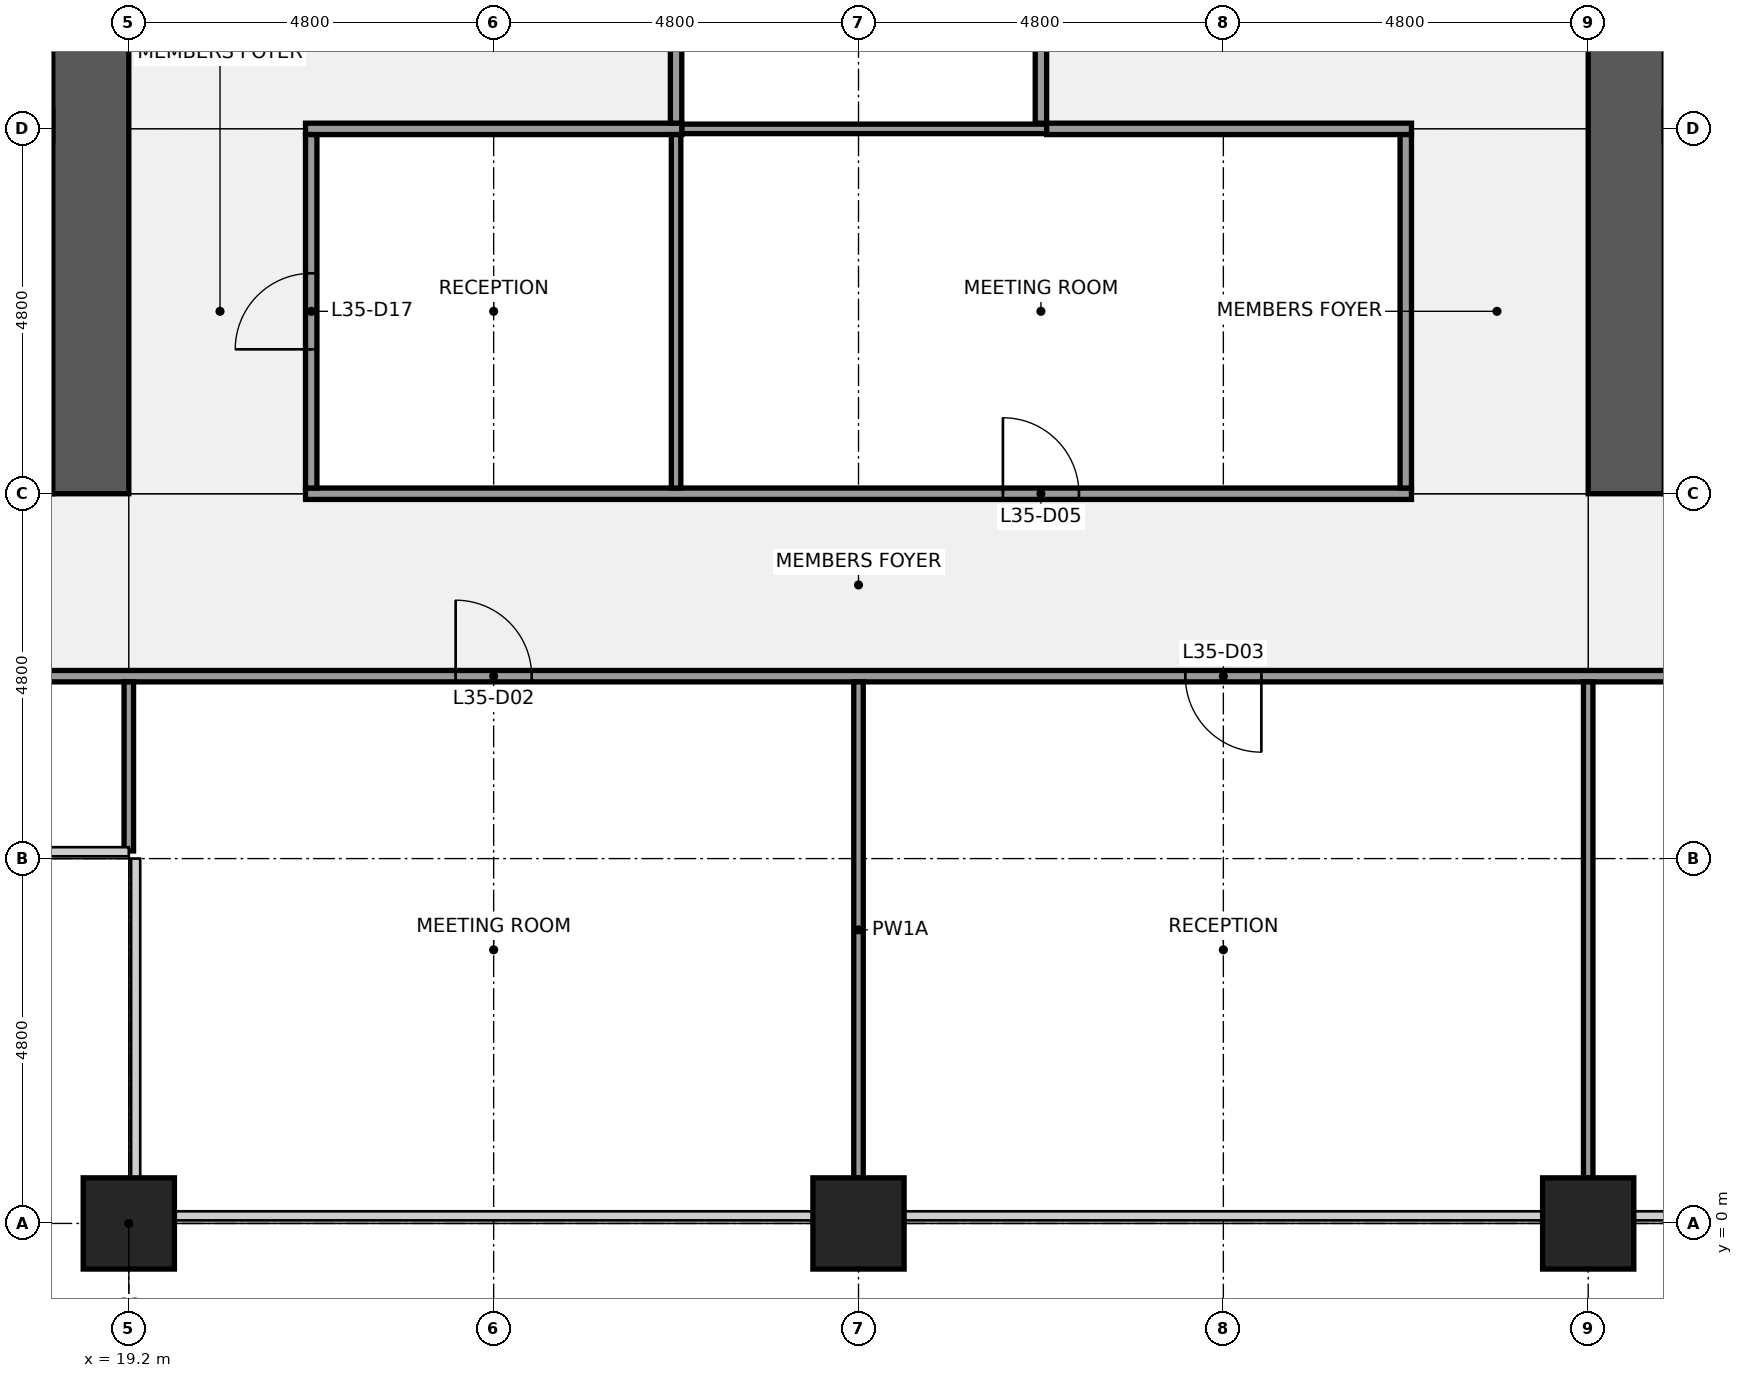
"""IFC4 building model, lengths in metres.
Left out: names, types, materials, properties, quantities, classifications, styles, units other than length and angle.
Written with IfcOpenShell. Run it as: python <this file> out.ifc"""

import sys

from ifc_helpers import new_model, si_unit, direction, frame, frame_2d, origin, origin_2d, place, context, subcontext, project, spatial, rectangle, extrude, element, fill, save


model = new_model("IFC4")
c1 = context("Model", 3, precision=1e-05, world=origin(), true_north=direction((0.0, 1.0)))
c2 = subcontext(c1, "Body", "Model", "MODEL_VIEW")
j1 = project(units=[si_unit("LENGTHUNIT", "METRE"), si_unit("PLANEANGLEUNIT", "RADIAN")], contexts=[c1])
p1 = place(None, origin())
s1 = spatial("IfcSite", under=j1, at=p1, CompositionType="ELEMENT")
p2 = place(p1, origin())
s2 = spatial("IfcBuilding", under=s1, at=p2, CompositionType="ELEMENT")
p3 = place(p2, frame((0.0, 0.0, 160.1)))
s3 = spatial("IfcBuildingStorey", under=s2, at=p3, CompositionType="ELEMENT", Elevation=160.1)
for number, where, z_axis, x_axis in (
    (1, (19.2, 0.0, 0.0), (0.0, 0.0, 1.0), (1.0, 0.0, 0.0)),
    (2, (28.8, 0.0, 0.0), (0.0, 0.0, 1.0), (1.0, 0.0, 0.0)),
    (3, (38.4, 0.0, 0.0), (0.0, 0.0, 1.0), (1.0, 0.0, 0.0)),
):
    element("IfcColumn", number, at=place(p3, frame(where, z_axis=z_axis, x_axis=x_axis)), inside=s3, PredefinedType="COLUMN", context=c2, shape_type="SweptSolid", body=[
        extrude(rectangle(XDim=1.2, YDim=1.2, at=origin_2d()), origin(), (0.0, 0.0, 1.0), 4.0),
    ])
p4 = place(p3, frame((18.2, 10.1, 0.0), z_axis=(0.0, 0.0, 1.0), x_axis=(-1.0, 0.0, 0.0)))
e4 = element("IfcWall", 4, at=p4, inside=s3, PredefinedType="SHEAR", context=c2, shape_type="SweptSolid", body=[
    extrude(rectangle(XDim=8.6, YDim=1.0, at=frame_2d((4.3, 0.0))), origin(), (0.0, 0.0, 1.0), 3.84),
])
p5 = place(p4, frame((0.85, 0.0, 0.0)))
e5 = element("IfcOpeningElement", 5, at=p5, cuts=e4, PredefinedType="OPENING", context=c2, shape_type="SweptSolid", body=[
    extrude(rectangle(XDim=1.1, YDim=2.1, at=frame_2d((0.55, 1.05))), frame((0.0, 0.51, 0.0), z_axis=(0.0, -1.0, 0.0), x_axis=(1.0, 0.0, 0.0)), (0.0, 0.0, 1.0), 1.02),
])
p6 = place(p3, frame((18.7, 38.4, 0.0), z_axis=(0.0, 0.0, 1.0), x_axis=(0.0, -1.0, 0.0)))
e6 = element("IfcWall", 6, at=p6, inside=s3, PredefinedType="SHEAR", context=c2, shape_type="SweptSolid", body=[
    extrude(rectangle(XDim=28.8, YDim=1.0, at=frame_2d((14.4, 0.0))), origin(), (0.0, 0.0, 1.0), 3.84),
])
p7 = place(p6, frame((18.3, 0.0, 0.0)))
e7 = element("IfcOpeningElement", 7, at=p7, cuts=e6, PredefinedType="OPENING", context=c2, shape_type="SweptSolid", body=[
    extrude(rectangle(XDim=1.8, YDim=2.1, at=frame_2d((0.9, 1.05))), frame((0.0, 0.51, 0.0), z_axis=(0.0, -1.0, 0.0), x_axis=(1.0, 0.0, 0.0)), (0.0, 0.0, 1.0), 1.02),
])
p8 = place(p6, frame((8.7, 0.0, 0.0)))
e8 = element("IfcOpeningElement", 8, at=p8, cuts=e6, PredefinedType="OPENING", context=c2, shape_type="SweptSolid", body=[
    extrude(rectangle(XDim=1.8, YDim=2.1, at=frame_2d((0.9, 1.05))), frame((0.0, 0.51, 0.0), z_axis=(0.0, -1.0, 0.0), x_axis=(1.0, 0.0, 0.0)), (0.0, 0.0, 1.0), 1.02),
])
p9 = place(p3, frame((1.0, 14.45, 0.0), z_axis=(0.0, 0.0, 1.0), x_axis=(1.0, 0.0, 0.0)))
e9 = element("IfcWall", 9, at=p9, inside=s3, PredefinedType="SHEAR", context=c2, shape_type="SweptSolid", body=[
    extrude(rectangle(XDim=17.2, YDim=0.4, at=frame_2d((8.6, 0.0))), origin(), (0.0, 0.0, 1.0), 3.84),
])
p10 = place(p3, frame((38.9, 9.6, 0.0), z_axis=(0.0, 0.0, 1.0), x_axis=(0.0, 1.0, 0.0)))
e10 = element("IfcWall", 10, at=p10, inside=s3, PredefinedType="SHEAR", context=c2, shape_type="SweptSolid", body=[
    extrude(rectangle(XDim=28.8, YDim=1.0, at=frame_2d((14.4, 0.0))), origin(), (0.0, 0.0, 1.0), 3.84),
])
p11 = place(p10, frame((8.7, 0.0, 0.0)))
e11 = element("IfcOpeningElement", 11, at=p11, cuts=e10, PredefinedType="OPENING", context=c2, shape_type="SweptSolid", body=[
    extrude(rectangle(XDim=1.8, YDim=2.1, at=frame_2d((0.9, 1.05))), frame((0.0, 0.51, 0.0), z_axis=(0.0, -1.0, 0.0), x_axis=(1.0, 0.0, 0.0)), (0.0, 0.0, 1.0), 1.02),
])
p12 = place(p10, frame((18.3, 0.0, 0.0)))
e12 = element("IfcOpeningElement", 12, at=p12, cuts=e10, PredefinedType="OPENING", context=c2, shape_type="SweptSolid", body=[
    extrude(rectangle(XDim=1.8, YDim=2.1, at=frame_2d((0.9, 1.05))), frame((0.0, 0.51, 0.0), z_axis=(0.0, -1.0, 0.0), x_axis=(1.0, 0.0, 0.0)), (0.0, 0.0, 1.0), 1.02),
])
p13 = place(p3, frame((9.7, 7.2, 0.0), z_axis=(0.0, 0.0, 1.0), x_axis=(1.0, 0.0, 0.0)))
e13 = element("IfcWall", 13, at=p13, inside=s3, PredefinedType="PARTITIONING", context=c2, shape_type="SweptSolid", body=[
    extrude(rectangle(XDim=38.2, YDim=0.15, at=frame_2d((19.1, 0.0))), origin(), (0.0, 0.0, 1.0), 2.849),
])
p14 = place(p13, frame((4.25, 0.0, 0.0)))
e14 = element("IfcOpeningElement", 14, at=p14, cuts=e13, PredefinedType="OPENING", context=c2, shape_type="SweptSolid", body=[
    extrude(rectangle(XDim=1.0, YDim=2.1, at=frame_2d((0.5, 1.05))), frame((0.0, 0.085, 0.0), z_axis=(0.0, -1.0, 0.0), x_axis=(1.0, 0.0, 0.0)), (0.0, 0.0, 1.0), 0.17),
])
p15 = place(p13, frame((13.8, 0.0, 0.0)))
e15 = element("IfcOpeningElement", 15, at=p15, cuts=e13, PredefinedType="OPENING", context=c2, shape_type="SweptSolid", body=[
    extrude(rectangle(XDim=1.0, YDim=2.1, at=frame_2d((0.5, 1.05))), frame((0.0, 0.085, 0.0), z_axis=(0.0, -1.0, 0.0), x_axis=(1.0, 0.0, 0.0)), (0.0, 0.0, 1.0), 0.17),
])
p16 = place(p13, frame((23.4, 0.0, 0.0)))
e16 = element("IfcOpeningElement", 16, at=p16, cuts=e13, PredefinedType="OPENING", context=c2, shape_type="SweptSolid", body=[
    extrude(rectangle(XDim=1.0, YDim=2.1, at=frame_2d((0.5, 1.05))), frame((0.0, 0.085, 0.0), z_axis=(0.0, -1.0, 0.0), x_axis=(1.0, 0.0, 0.0)), (0.0, 0.0, 1.0), 0.17),
])
p17 = place(p13, frame((32.95, 0.0, 0.0)))
e17 = element("IfcOpeningElement", 17, at=p17, cuts=e13, PredefinedType="OPENING", context=c2, shape_type="SweptSolid", body=[
    extrude(rectangle(XDim=1.0, YDim=2.1, at=frame_2d((0.5, 1.05))), frame((0.0, 0.085, 0.0), z_axis=(0.0, -1.0, 0.0), x_axis=(1.0, 0.0, 0.0)), (0.0, 0.0, 1.0), 0.17),
])
p18 = place(p3, frame((21.525, 9.6, 0.0), z_axis=(0.0, 0.0, 1.0), x_axis=(1.0, 0.0, 0.0)))
e18 = element("IfcWall", 18, at=p18, inside=s3, PredefinedType="PARTITIONING", context=c2, shape_type="SweptSolid", body=[
    extrude(rectangle(XDim=14.55, YDim=0.15, at=frame_2d((7.275, 0.0))), origin(), (0.0, 0.0, 1.0), 2.849),
])
p19 = place(p18, frame((9.175, 0.0, 0.0)))
e19 = element("IfcOpeningElement", 19, at=p19, cuts=e18, PredefinedType="OPENING", context=c2, shape_type="SweptSolid", body=[
    extrude(rectangle(XDim=1.0, YDim=2.1, at=frame_2d((0.5, 1.05))), frame((0.0, 0.085, 0.0), z_axis=(0.0, -1.0, 0.0), x_axis=(1.0, 0.0, 0.0)), (0.0, 0.0, 1.0), 0.17),
])
p20 = place(p3, frame((26.475, 14.4, 0.0), z_axis=(0.0, 0.0, 1.0), x_axis=(1.0, 0.0, 0.0)))
e20 = element("IfcWall", 20, at=p20, inside=s3, PredefinedType="PARTITIONING", context=c2, shape_type="SweptSolid", body=[
    extrude(rectangle(XDim=4.8, YDim=0.125, at=frame_2d((2.4, 0.0))), origin(), (0.0, 0.0, 1.0), 2.849),
])
p21 = place(p3, frame((21.525, 14.4, 0.0), z_axis=(0.0, 0.0, 1.0), x_axis=(1.0, 0.0, 0.0)))
e21 = element("IfcWall", 21, at=p21, inside=s3, PredefinedType="PARTITIONING", context=c2, shape_type="SweptSolid", body=[
    extrude(rectangle(XDim=4.95, YDim=0.15, at=frame_2d((2.475, 0.0))), origin(), (0.0, 0.0, 1.0), 2.849),
])
p22 = place(p3, frame((31.275, 14.4, 0.0), z_axis=(0.0, 0.0, 1.0), x_axis=(1.0, 0.0, 0.0)))
e22 = element("IfcWall", 22, at=p22, inside=s3, PredefinedType="PARTITIONING", context=c2, shape_type="SweptSolid", body=[
    extrude(rectangle(XDim=4.8, YDim=0.15, at=frame_2d((2.4, 0.0))), origin(), (0.0, 0.0, 1.0), 2.849),
])
p23 = place(p3, frame((19.2, 4.9, 0.0), z_axis=(0.0, 0.0, 1.0), x_axis=(0.0, 1.0, 0.0)))
e23 = element("IfcWall", 23, at=p23, inside=s3, PredefinedType="PARTITIONING", context=c2, shape_type="SweptSolid", body=[
    extrude(rectangle(XDim=2.225, YDim=0.125, at=frame_2d((1.113, 0.0))), origin(), (0.0, 0.0, 1.0), 2.849),
])
p24 = place(p3, frame((21.6, 9.675, 0.0), z_axis=(0.0, 0.0, 1.0), x_axis=(0.0, 1.0, 0.0)))
e24 = element("IfcWall", 24, at=p24, inside=s3, PredefinedType="PARTITIONING", context=c2, shape_type="SweptSolid", body=[
    extrude(rectangle(XDim=4.65, YDim=0.15, at=frame_2d((2.325, 0.0))), origin(), (0.0, 0.0, 1.0), 2.849),
])
p25 = place(p24, frame((1.825, 0.0, 0.0)))
e25 = element("IfcOpeningElement", 25, at=p25, cuts=e24, PredefinedType="OPENING", context=c2, shape_type="SweptSolid", body=[
    extrude(rectangle(XDim=1.0, YDim=2.1, at=frame_2d((0.5, 1.05))), frame((0.0, 0.085, 0.0), z_axis=(0.0, -1.0, 0.0), x_axis=(1.0, 0.0, 0.0)), (0.0, 0.0, 1.0), 0.17),
])
p26 = place(p3, frame((26.4, 9.675, 0.0), z_axis=(0.0, 0.0, 1.0), x_axis=(0.0, 1.0, 0.0)))
e26 = element("IfcWall", 26, at=p26, inside=s3, PredefinedType="PARTITIONING", context=c2, shape_type="SweptSolid", body=[
    extrude(rectangle(XDim=4.65, YDim=0.125, at=frame_2d((2.325, 0.0))), origin(), (0.0, 0.0, 1.0), 2.849),
])
p27 = place(p3, frame((26.4, 14.475, 0.0), z_axis=(0.0, 0.0, 1.0), x_axis=(0.0, 1.0, 0.0)))
e27 = element("IfcWall", 27, at=p27, inside=s3, PredefinedType="PARTITIONING", context=c2, shape_type="SweptSolid", body=[
    extrude(rectangle(XDim=13.05, YDim=0.15, at=frame_2d((6.525, 0.0))), origin(), (0.0, 0.0, 1.0), 2.849),
])
p28 = place(p27, frame((6.025, 0.0, 0.0)))
e28 = element("IfcOpeningElement", 28, at=p28, cuts=e27, PredefinedType="OPENING", context=c2, shape_type="SweptSolid", body=[
    extrude(rectangle(XDim=1.0, YDim=2.1, at=frame_2d((0.5, 1.05))), frame((0.0, 0.085, 0.0), z_axis=(0.0, -1.0, 0.0), x_axis=(1.0, 0.0, 0.0)), (0.0, 0.0, 1.0), 0.17),
])
p29 = place(p3, frame((28.8, 0.6, 0.0), z_axis=(0.0, 0.0, 1.0), x_axis=(0.0, 1.0, 0.0)))
e29 = element("IfcWall", 29, at=p29, inside=s3, PredefinedType="PARTITIONING", context=c2, shape_type="SweptSolid", body=[
    extrude(rectangle(XDim=6.525, YDim=0.125, at=frame_2d((3.262, 0.0))), origin(), (0.0, 0.0, 1.0), 2.849),
])
p30 = place(p3, frame((31.2, 14.475, 0.0), z_axis=(0.0, 0.0, 1.0), x_axis=(0.0, 1.0, 0.0)))
e30 = element("IfcWall", 30, at=p30, inside=s3, PredefinedType="PARTITIONING", context=c2, shape_type="SweptSolid", body=[
    extrude(rectangle(XDim=13.05, YDim=0.15, at=frame_2d((6.525, 0.0))), origin(), (0.0, 0.0, 1.0), 2.849),
])
p31 = place(p3, frame((36.0, 9.675, 0.0), z_axis=(0.0, 0.0, 1.0), x_axis=(0.0, 1.0, 0.0)))
e31 = element("IfcWall", 31, at=p31, inside=s3, PredefinedType="PARTITIONING", context=c2, shape_type="SweptSolid", body=[
    extrude(rectangle(XDim=4.65, YDim=0.15, at=frame_2d((2.325, 0.0))), origin(), (0.0, 0.0, 1.0), 2.849),
])
p32 = place(p3, frame((38.4, 0.6, 0.0), z_axis=(0.0, 0.0, 1.0), x_axis=(0.0, 1.0, 0.0)))
e32 = element("IfcWall", 32, at=p32, inside=s3, PredefinedType="PARTITIONING", context=c2, shape_type="SweptSolid", body=[
    extrude(rectangle(XDim=6.525, YDim=0.125, at=frame_2d((3.262, 0.0))), origin(), (0.0, 0.0, 1.0), 2.849),
])
for number, where, z_axis, x_axis in (
    (33, (19.2, -1.05, 0.0), (0.0, 0.0, 1.0), (1.0, 0.0, 0.0)),
    (34, (38.4, -1.05, 0.0), (0.0, 0.0, 1.0), (1.0, 0.0, 0.0)),
):
    element("IfcColumn", number, at=place(p3, frame(where, z_axis=z_axis, x_axis=x_axis)), inside=s3, PredefinedType="PILASTER", context=c2, shape_type="SweptSolid", body=[
        extrude(rectangle(XDim=3.6, YDim=0.9, at=origin_2d()), origin(), (0.0, 0.0, 1.0), 4.0),
    ])
p33 = place(p15, origin())
e35 = element("IfcDoor", 35, at=p33, inside=s3, OperationType="SINGLE_SWING_LEFT", PredefinedType="DOOR", context=c2, shape_type="SweptSolid", body=[
    extrude(rectangle(XDim=1.0, YDim=2.1, at=frame_2d((0.5, 1.05))), frame((0.0, 0.025, 0.0), z_axis=(0.0, -1.0, 0.0), x_axis=(1.0, 0.0, 0.0)), (0.0, 0.0, 1.0), 0.05),
])
fill(e15, e35)
p34 = place(p16, origin())
e36 = element("IfcDoor", 36, at=p34, inside=s3, OperationType="SINGLE_SWING_RIGHT", PredefinedType="DOOR", context=c2, shape_type="SweptSolid", body=[
    extrude(rectangle(XDim=1.0, YDim=2.1, at=frame_2d((0.5, 1.05))), frame((0.0, 0.025, 0.0), z_axis=(0.0, -1.0, 0.0), x_axis=(1.0, 0.0, 0.0)), (0.0, 0.0, 1.0), 0.05),
])
fill(e16, e36)
p35 = place(p19, origin())
e37 = element("IfcDoor", 37, at=p35, inside=s3, OperationType="SINGLE_SWING_LEFT", PredefinedType="DOOR", context=c2, shape_type="SweptSolid", body=[
    extrude(rectangle(XDim=1.0, YDim=2.1, at=frame_2d((0.5, 1.05))), frame((0.0, 0.025, 0.0), z_axis=(0.0, -1.0, 0.0), x_axis=(1.0, 0.0, 0.0)), (0.0, 0.0, 1.0), 0.05),
])
fill(e19, e37)
p36 = place(p25, origin())
e38 = element("IfcDoor", 38, at=p36, inside=s3, OperationType="SINGLE_SWING_LEFT", PredefinedType="DOOR", context=c2, shape_type="SweptSolid", body=[
    extrude(rectangle(XDim=1.0, YDim=2.1, at=frame_2d((0.5, 1.05))), frame((0.0, 0.025, 0.0), z_axis=(0.0, -1.0, 0.0), x_axis=(1.0, 0.0, 0.0)), (0.0, 0.0, 1.0), 0.05),
])
fill(e25, e38)
save(model, sys.argv[1])
